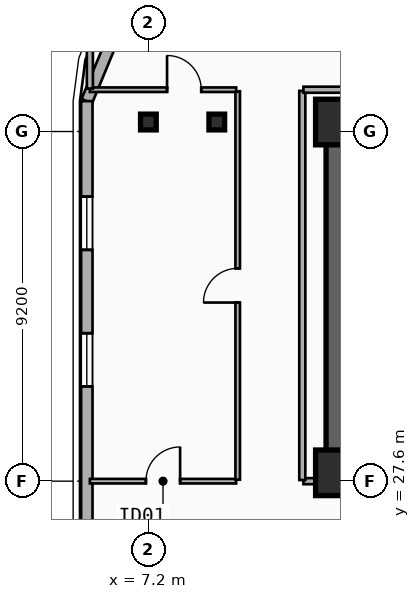
"""IFC4 building model, lengths in metres.
Left out: names, types, materials, properties, quantities, classifications, styles, units other than length and angle.
Written with IfcOpenShell. Run it as: python <this file> out.ifc"""

import sys

from ifc_helpers import new_model, si_unit, direction, frame, frame_2d, origin, origin_2d, place, context, subcontext, project, spatial, rectangle, i_section, extrude, element, fill, save


model = new_model("IFC4")
c1 = context("Model", 3, precision=1e-05, world=origin(), true_north=direction((0.0, 1.0)))
c2 = subcontext(c1, "Body", "Model", "MODEL_VIEW")
j1 = project(units=[si_unit("LENGTHUNIT", "METRE"), si_unit("PLANEANGLEUNIT", "RADIAN")], contexts=[c1])
p1 = place(None, origin())
s1 = spatial("IfcSite", under=j1, at=p1, CompositionType="ELEMENT")
p2 = place(p1, origin())
s2 = spatial("IfcBuilding", under=s1, at=p2, CompositionType="ELEMENT")
p3 = place(p2, frame((0.0, 0.0, 173.2)))
s3 = spatial("IfcBuildingStorey", under=s2, at=p3, CompositionType="ELEMENT", Elevation=173.2)
p4 = place(p3, frame((12.15, 37.05, 0.0), z_axis=(0.0, 0.0, 1.0), x_axis=(1.0, 0.0, 0.0)))
e1 = element("IfcWall", 1, at=p4, inside=s3, PredefinedType="SHEAR", context=c2, shape_type="SweptSolid", body=[
    extrude(rectangle(XDim=33.23, YDim=0.55, at=frame_2d((16.615, 0.0))), origin(), (0.0, 0.0, 1.0), 3.55),
])
p5 = place(p3, frame((21.18, 27.82, 0.0), z_axis=(0.0, 0.0, 1.0), x_axis=(-1.0, 0.0, 0.0)))
e2 = element("IfcWall", 2, at=p5, inside=s3, PredefinedType="SHEAR", context=c2, shape_type="SweptSolid", body=[
    extrude(rectangle(XDim=9.03, YDim=0.55, at=frame_2d((4.515, 0.0))), origin(), (0.0, 0.0, 1.0), 3.55),
])
p6 = place(p5, frame((2.68, 0.0, 0.0)))
e3 = element("IfcOpeningElement", 3, at=p6, cuts=e2, PredefinedType="OPENING", context=c2, shape_type="SweptSolid", body=[
    extrude(rectangle(XDim=1.1, YDim=2.15, at=frame_2d((0.55, 1.075))), frame((0.0, 0.285, 0.0), z_axis=(0.0, -1.0, 0.0), x_axis=(1.0, 0.0, 0.0)), (0.0, 0.0, 1.0), 0.57),
])
p7 = place(p3, frame((12.15, 28.095, 0.0), z_axis=(0.0, 0.0, 1.0), x_axis=(0.0, 1.0, 0.0)))
e4 = element("IfcWall", 4, at=p7, inside=s3, PredefinedType="SHEAR", context=c2, shape_type="SweptSolid", body=[
    extrude(rectangle(XDim=8.68, YDim=0.55, at=frame_2d((4.34, 0.0))), origin(), (0.0, 0.0, 1.0), 3.55),
])
for number, where, z_axis, x_axis in (
    (5, (12.2, 27.82, 0.0), (0.0, 0.0, 1.0), (1.0, 0.0, 0.0)),
    (6, (12.2, 37.05, 0.0), (0.0, 0.0, 1.0), (1.0, 0.0, 0.0)),
):
    element("IfcColumn", number, at=place(p3, frame(where, z_axis=z_axis, x_axis=x_axis)), inside=s3, PredefinedType="COLUMN", context=c2, shape_type="SweptSolid", body=[
        extrude(rectangle(XDim=1.2, YDim=1.2, at=origin_2d()), origin(), (0.0, 0.0, 1.0), 3.55),
    ])
for number, where, z_axis, x_axis in (
    (7, (9.0, 37.05, 0.0), (0.0, 0.0, 1.0), (1.0, 0.0, 0.0)),
    (8, (7.2, 37.05, 0.0), (0.0, 0.0, 1.0), (1.0, 0.0, 0.0)),
):
    element("IfcColumn", number, at=place(p3, frame(where, z_axis=z_axis, x_axis=x_axis)), inside=s3, PredefinedType="COLUMN", context=c2, shape_type="SweptSolid", body=[
        extrude(i_section(OverallWidth=0.413, OverallDepth=0.415, WebThickness=0.03, FlangeThickness=0.047, FilletRadius=0.015, at=origin_2d()), origin(), (0.0, 0.0, 1.0), 3.55),
    ])
p8 = place(p3, frame((5.58, 37.6, 0.0), z_axis=(0.0, 0.0, 1.0), x_axis=(0.382636798336, 0.92389884758, 0.0)))
e9 = element("IfcWall", 9, at=p8, inside=s3, PredefinedType="SOLIDWALL", context=c2, shape_type="SweptSolid", body=[
    extrude(rectangle(XDim=3.077, YDim=0.3, at=frame_2d((1.538, 0.0))), origin(), (0.0, 0.0, 1.0), 3.29),
])
p9 = place(p3, frame((5.58, 14.6, 0.0), z_axis=(0.0, 0.0, 1.0), x_axis=(0.0, 1.0, 0.0)))
e10 = element("IfcWall", 10, at=p9, inside=s3, PredefinedType="SOLIDWALL", context=c2, shape_type="SweptSolid", body=[
    extrude(rectangle(XDim=23.0, YDim=0.3, at=frame_2d((11.5, 0.0))), origin(), (0.0, 0.0, 1.0), 3.29),
])
p10 = place(p9, frame((15.493, 0.0, 0.34)))
e11 = element("IfcOpeningElement", 11, at=p10, cuts=e10, PredefinedType="OPENING", context=c2, shape_type="SweptSolid", body=[
    extrude(rectangle(XDim=1.4, YDim=2.1, at=frame_2d((0.7, 1.05))), frame((0.0, 0.16, 0.0), z_axis=(0.0, -1.0, 0.0), x_axis=(1.0, 0.0, 0.0)), (0.0, 0.0, 1.0), 0.32),
])
p11 = place(p9, frame((19.087, 0.0, 0.34)))
e12 = element("IfcOpeningElement", 12, at=p11, cuts=e10, PredefinedType="OPENING", context=c2, shape_type="SweptSolid", body=[
    extrude(rectangle(XDim=1.4, YDim=2.1, at=frame_2d((0.7, 1.05))), frame((0.0, 0.16, 0.0), z_axis=(0.0, -1.0, 0.0), x_axis=(1.0, 0.0, 0.0)), (0.0, 0.0, 1.0), 0.32),
])
p12 = place(p9, frame((2.83, 0.0, 0.34)))
e13 = element("IfcOpeningElement", 13, at=p12, cuts=e10, PredefinedType="OPENING", context=c2, shape_type="SweptSolid", body=[
    extrude(rectangle(XDim=1.4, YDim=2.1, at=frame_2d((0.7, 1.05))), frame((0.0, 0.16, 0.0), z_axis=(0.0, -1.0, 0.0), x_axis=(1.0, 0.0, 0.0)), (0.0, 0.0, 1.0), 0.32),
])
p13 = place(p9, frame((6.74, 0.0, 0.34)))
e14 = element("IfcOpeningElement", 14, at=p13, cuts=e10, PredefinedType="OPENING", context=c2, shape_type="SweptSolid", body=[
    extrude(rectangle(XDim=1.4, YDim=2.1, at=frame_2d((0.7, 1.05))), frame((0.0, 0.16, 0.0), z_axis=(0.0, -1.0, 0.0), x_axis=(1.0, 0.0, 0.0)), (0.0, 0.0, 1.0), 0.32),
])
p14 = place(p3, frame((5.66, 27.6, 0.0), z_axis=(0.0, 0.0, 1.0), x_axis=(1.0, 0.0, 0.0)))
e15 = element("IfcWall", 15, at=p14, inside=s3, PredefinedType="PARTITIONING", context=c2, shape_type="SweptSolid", body=[
    extrude(rectangle(XDim=3.85, YDim=0.12, at=frame_2d((1.925, 0.0))), origin(), (0.0, 0.0, 1.0), 2.62),
])
p15 = place(p14, frame((1.475, 0.0, 0.0)))
e16 = element("IfcOpeningElement", 16, at=p15, cuts=e15, PredefinedType="OPENING", context=c2, shape_type="SweptSolid", body=[
    extrude(rectangle(XDim=0.9, YDim=2.1, at=frame_2d((0.45, 1.05))), frame((0.0, 0.07, 0.0), z_axis=(0.0, -1.0, 0.0), x_axis=(1.0, 0.0, 0.0)), (0.0, 0.0, 1.0), 0.14),
])
p16 = place(p3, frame((9.55, 27.64, 0.0), z_axis=(0.0, 0.0, 1.0), x_axis=(0.0, 1.0, 0.0)))
e17 = element("IfcWall", 17, at=p16, inside=s3, PredefinedType="PARTITIONING", context=c2, shape_type="SweptSolid", body=[
    extrude(rectangle(XDim=10.22, YDim=0.12, at=frame_2d((5.11, 0.0))), origin(), (0.0, 0.0, 1.0), 2.77),
])
p17 = place(p16, frame((4.66, 0.0, 0.0)))
e18 = element("IfcOpeningElement", 18, at=p17, cuts=e17, PredefinedType="OPENING", context=c2, shape_type="SweptSolid", body=[
    extrude(rectangle(XDim=0.9, YDim=2.1, at=frame_2d((0.45, 1.05))), frame((0.0, 0.07, 0.0), z_axis=(0.0, -1.0, 0.0), x_axis=(1.0, 0.0, 0.0)), (0.0, 0.0, 1.0), 0.14),
])
p18 = place(p3, frame((5.66, 37.9, 0.0), z_axis=(0.0, 0.0, 1.0), x_axis=(1.0, 0.0, 0.0)))
e19 = element("IfcWall", 19, at=p18, inside=s3, PredefinedType="PARTITIONING", context=c2, shape_type="SweptSolid", body=[
    extrude(rectangle(XDim=3.85, YDim=0.12, at=frame_2d((1.925, 0.0))), origin(), (0.0, 0.0, 1.0), 3.29),
])
p19 = place(p18, frame((2.031, 0.0, 0.0)))
e20 = element("IfcOpeningElement", 20, at=p19, cuts=e19, PredefinedType="OPENING", context=c2, shape_type="SweptSolid", body=[
    extrude(rectangle(XDim=0.9, YDim=2.1, at=frame_2d((0.45, 1.05))), frame((0.0, 0.07, 0.0), z_axis=(0.0, -1.0, 0.0), x_axis=(1.0, 0.0, 0.0)), (0.0, 0.0, 1.0), 0.14),
])
p20 = place(p3, frame((11.28, 27.6, 0.0), z_axis=(0.0, 0.0, 1.0), x_axis=(1.0, 0.0, 0.0)))
e21 = element("IfcWall", 21, at=p20, inside=s3, PredefinedType="PARTITIONING", context=c2, shape_type="SweptSolid", body=[
    extrude(rectangle(XDim=0.84, YDim=0.16, at=frame_2d((0.42, 0.0))), origin(), (0.0, 0.0, 1.0), 2.36),
])
p21 = place(p3, frame((11.25, 27.63, 0.0), z_axis=(0.0, 0.0, 1.0), x_axis=(0.0, 1.0, 0.0)))
e22 = element("IfcWall", 22, at=p21, inside=s3, PredefinedType="PARTITIONING", context=c2, shape_type="SweptSolid", body=[
    extrude(rectangle(XDim=10.24, YDim=0.16, at=frame_2d((5.12, 0.0))), origin(), (0.0, 0.0, 1.0), 2.77),
])
p22 = place(p3, frame((11.28, 37.9, 0.0), z_axis=(0.0, 0.0, 1.0), x_axis=(1.0, 0.0, 0.0)))
e23 = element("IfcWall", 23, at=p22, inside=s3, PredefinedType="PARTITIONING", context=c2, shape_type="SweptSolid", body=[
    extrude(rectangle(XDim=35.04, YDim=0.16, at=frame_2d((17.52, 0.0))), origin(), (0.0, 0.0, 1.0), 3.29),
])
p23 = place(p3, frame((5.66, 37.93, 0.0), z_axis=(0.0, 0.0, 1.0), x_axis=(0.0, 1.0, 0.0)))
e24 = element("IfcWall", 24, at=p23, inside=s3, PredefinedType="PARTITIONING", context=c2, shape_type="SweptSolid", body=[
    extrude(rectangle(XDim=1.44, YDim=0.16, at=frame_2d((0.72, 0.0))), origin(), (0.0, 0.0, 1.0), 3.29),
])
p24 = place(p10, origin())
e25 = element("IfcWindow", 25, at=p24, inside=s3, PartitioningType="SINGLE_PANEL", PredefinedType="WINDOW", context=c2, shape_type="SweptSolid", body=[
    extrude(rectangle(XDim=1.4, YDim=2.1, at=frame_2d((0.7, 1.05))), frame((0.0, 0.03, 0.0), z_axis=(0.0, -1.0, 0.0), x_axis=(1.0, 0.0, 0.0)), (0.0, 0.0, 1.0), 0.06),
])
fill(e11, e25)
p25 = place(p11, origin())
e26 = element("IfcWindow", 26, at=p25, inside=s3, PartitioningType="SINGLE_PANEL", PredefinedType="WINDOW", context=c2, shape_type="SweptSolid", body=[
    extrude(rectangle(XDim=1.4, YDim=2.1, at=frame_2d((0.7, 1.05))), frame((0.0, 0.03, 0.0), z_axis=(0.0, -1.0, 0.0), x_axis=(1.0, 0.0, 0.0)), (0.0, 0.0, 1.0), 0.06),
])
fill(e12, e26)
p26 = place(p15, origin())
e27 = element("IfcDoor", 27, at=p26, inside=s3, OperationType="SINGLE_SWING_RIGHT", PredefinedType="DOOR", context=c2, shape_type="SweptSolid", body=[
    extrude(rectangle(XDim=0.9, YDim=2.1, at=frame_2d((0.45, 1.05))), frame((0.0, 0.025, 0.0), z_axis=(0.0, -1.0, 0.0), x_axis=(1.0, 0.0, 0.0)), (0.0, 0.0, 1.0), 0.05),
])
fill(e16, e27)
p27 = place(p17, origin())
e28 = element("IfcDoor", 28, at=p27, inside=s3, OperationType="SINGLE_SWING_LEFT", PredefinedType="DOOR", context=c2, shape_type="SweptSolid", body=[
    extrude(rectangle(XDim=0.9, YDim=2.1, at=frame_2d((0.45, 1.05))), frame((0.0, 0.025, 0.0), z_axis=(0.0, -1.0, 0.0), x_axis=(1.0, 0.0, 0.0)), (0.0, 0.0, 1.0), 0.05),
])
fill(e18, e28)
p28 = place(p19, origin())
e29 = element("IfcDoor", 29, at=p28, inside=s3, OperationType="SINGLE_SWING_LEFT", PredefinedType="DOOR", context=c2, shape_type="SweptSolid", body=[
    extrude(rectangle(XDim=0.9, YDim=2.1, at=frame_2d((0.45, 1.05))), frame((0.0, 0.025, 0.0), z_axis=(0.0, -1.0, 0.0), x_axis=(1.0, 0.0, 0.0)), (0.0, 0.0, 1.0), 0.05),
])
fill(e20, e29)
save(model, sys.argv[1])
